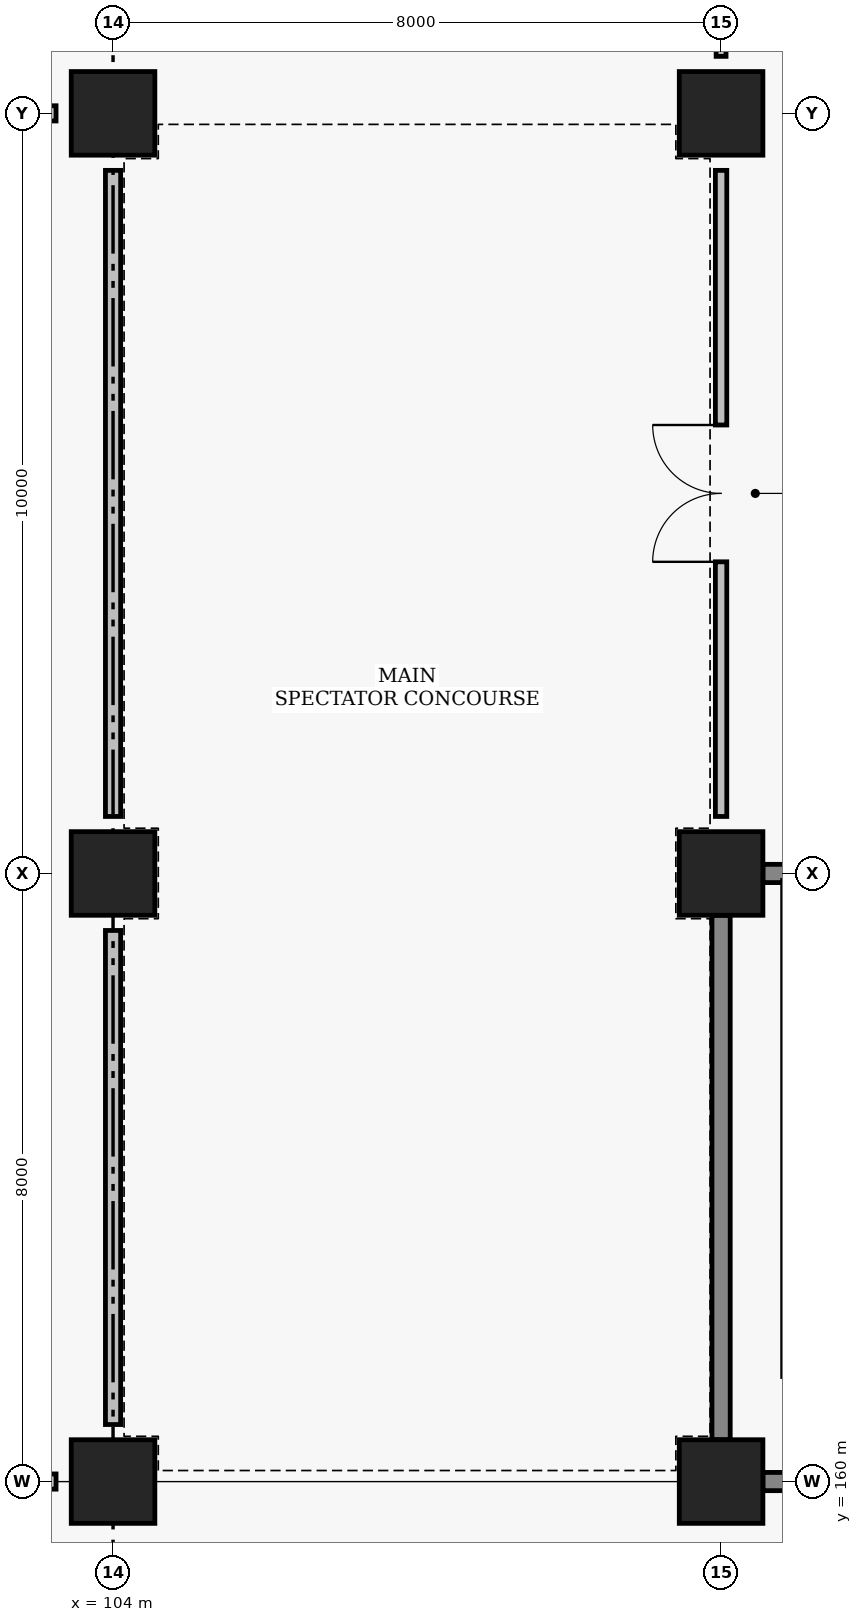
"""IFC4 building model, lengths in metres.
Left out: names, types, materials, properties, quantities, classifications, styles, units other than length and angle.
Written with IfcOpenShell. Run it as: python <this file> out.ifc"""

import sys

from ifc_helpers import new_model, si_unit, direction, frame, frame_2d, origin, origin_2d, place, context, subcontext, project, spatial, rectangle, extrude, element, fill, save


model = new_model("IFC4")
c1 = context("Model", 3, precision=1e-05, world=origin(), true_north=direction((0.0, 1.0)))
c2 = subcontext(c1, "Body", "Model", "MODEL_VIEW")
j1 = project(units=[si_unit("LENGTHUNIT", "METRE"), si_unit("PLANEANGLEUNIT", "RADIAN")], contexts=[c1])
p1 = place(None, origin())
s1 = spatial("IfcSite", under=j1, at=p1, CompositionType="ELEMENT")
p2 = place(p1, origin())
s2 = spatial("IfcBuilding", under=s1, at=p2, CompositionType="ELEMENT")
p3 = place(p2, origin())
s3 = spatial("IfcBuildingStorey", under=s2, at=p3, CompositionType="ELEMENT", Elevation=0.0)
for number, where, z_axis, x_axis in (
    (1, (104.0, 160.0, 0.0), (0.0, 0.0, 1.0), (1.0, 0.0, 0.0)),
    (2, (104.0, 168.0, 0.0), (0.0, 0.0, 1.0), (1.0, 0.0, 0.0)),
    (3, (104.0, 178.0, 0.0), (0.0, 0.0, 1.0), (1.0, 0.0, 0.0)),
    (4, (112.0, 160.0, 0.0), (0.0, 0.0, 1.0), (1.0, 0.0, 0.0)),
    (5, (112.0, 168.0, 0.0), (0.0, 0.0, 1.0), (1.0, 0.0, 0.0)),
    (6, (112.0, 178.0, 0.0), (0.0, 0.0, 1.0), (1.0, 0.0, 0.0)),
):
    element("IfcColumn", number, at=place(p3, frame(where, z_axis=z_axis, x_axis=x_axis)), inside=s3, PredefinedType="COLUMN", context=c2, shape_type="SweptSolid", body=[
        extrude(rectangle(XDim=1.1, YDim=1.1, at=origin_2d()), origin(), (0.0, 0.0, 1.0), 4.8),
    ])
p4 = place(p3, frame((112.55, 160.0, 0.0), z_axis=(0.0, 0.0, 1.0), x_axis=(1.0, 0.0, 0.0)))
e7 = element("IfcWall", 7, at=p4, inside=s3, PredefinedType="SHEAR", context=c2, shape_type="SweptSolid", body=[
    extrude(rectangle(XDim=6.9, YDim=0.24, at=frame_2d((3.45, 0.0))), origin(), (0.0, 0.0, 1.0), 3.66),
])
p5 = place(p4, frame((4.75, 0.0, 0.0)))
e8 = element("IfcOpeningElement", 8, at=p5, cuts=e7, PredefinedType="OPENING", context=c2, shape_type="SweptSolid", body=[
    extrude(rectangle(XDim=1.1, YDim=2.2, at=frame_2d((0.55, 1.1))), frame((0.0, 0.13, 0.0), z_axis=(0.0, -1.0, 0.0), x_axis=(1.0, 0.0, 0.0)), (0.0, 0.0, 1.0), 0.26),
])
for number, where, z_axis, x_axis in (
    (9, (112.55, 168.0, 0.0), (0.0, 0.0, 1.0), (1.0, 0.0, 0.0)),
    (10, (112.0, 160.55, 0.0), (0.0, 0.0, 1.0), (0.0, 1.0, 0.0)),
):
    element("IfcWall", number, at=place(p3, frame(where, z_axis=z_axis, x_axis=x_axis)), inside=s3, PredefinedType="SHEAR", context=c2, shape_type="SweptSolid", body=[
        extrude(rectangle(XDim=6.9, YDim=0.24, at=frame_2d((3.45, 0.0))), origin(), (0.0, 0.0, 1.0), 3.71),
    ])
p6 = place(p3, frame((104.0, 160.75, 0.0), z_axis=(0.0, 0.0, 1.0), x_axis=(0.0, 1.0, 0.0)))
e11 = element("IfcWall", 11, at=p6, inside=s3, PredefinedType="PARTITIONING", context=c2, shape_type="SweptSolid", body=[
    extrude(rectangle(XDim=6.5, YDim=0.2, at=frame_2d((3.25, 0.0))), origin(), (0.0, 0.0, 1.0), 3.81),
])
p7 = place(p3, frame((96.75, 160.0, 0.0), z_axis=(0.0, 0.0, 1.0), x_axis=(1.0, 0.0, 0.0)))
e12 = element("IfcWall", 12, at=p7, inside=s3, PredefinedType="PARTITIONING", context=c2, shape_type="SweptSolid", body=[
    extrude(rectangle(XDim=6.5, YDim=0.2, at=frame_2d((3.25, 0.0))), origin(), (0.0, 0.0, 1.0), 3.91),
])
p8 = place(p3, frame((104.0, 168.75, 0.0), z_axis=(0.0, 0.0, 1.0), x_axis=(0.0, 1.0, 0.0)))
e13 = element("IfcWall", 13, at=p8, inside=s3, PredefinedType="PARTITIONING", context=c2, shape_type="SweptSolid", body=[
    extrude(rectangle(XDim=8.5, YDim=0.2, at=frame_2d((4.25, 0.0))), origin(), (0.0, 0.0, 1.0), 3.71),
])
p9 = place(p3, frame((96.75, 178.0, 0.0), z_axis=(0.0, 0.0, 1.0), x_axis=(1.0, 0.0, 0.0)))
e14 = element("IfcWall", 14, at=p9, inside=s3, PredefinedType="PARTITIONING", context=c2, shape_type="SweptSolid", body=[
    extrude(rectangle(XDim=6.5, YDim=0.2, at=frame_2d((3.25, 0.0))), origin(), (0.0, 0.0, 1.0), 3.91),
])
p10 = place(p3, frame((112.0, 178.75, 0.0), z_axis=(0.0, 0.0, 1.0), x_axis=(0.0, 1.0, 0.0)))
e15 = element("IfcWall", 15, at=p10, inside=s3, PredefinedType="PARTITIONING", context=c2, shape_type="SweptSolid", body=[
    extrude(rectangle(XDim=8.5, YDim=0.13, at=frame_2d((4.25, 0.0))), origin(), (0.0, 0.0, 1.0), 3.77),
])
p11 = place(p10, frame((3.75, 0.0, 0.0)))
e16 = element("IfcOpeningElement", 16, at=p11, cuts=e15, PredefinedType="OPENING", context=c2, shape_type="SweptSolid", body=[
    extrude(rectangle(XDim=1.0, YDim=2.1, at=frame_2d((0.5, 1.05))), frame((0.0, 0.075, 0.0), z_axis=(0.0, -1.0, 0.0), x_axis=(1.0, 0.0, 0.0)), (0.0, 0.0, 1.0), 0.15),
])
p12 = place(p3, frame((112.0, 168.75, 0.0), z_axis=(0.0, 0.0, 1.0), x_axis=(0.0, 1.0, 0.0)))
e17 = element("IfcWall", 17, at=p12, inside=s3, PredefinedType="PARTITIONING", context=c2, shape_type="SweptSolid", body=[
    extrude(rectangle(XDim=8.5, YDim=0.15, at=frame_2d((4.25, 0.0))), origin(), (0.0, 0.0, 1.0), 3.71),
])
p13 = place(p12, frame((3.35, 0.0, 0.0)))
e18 = element("IfcOpeningElement", 18, at=p13, cuts=e17, PredefinedType="OPENING", context=c2, shape_type="SweptSolid", body=[
    extrude(rectangle(XDim=1.8, YDim=2.3, at=frame_2d((0.9, 1.15))), frame((0.0, 0.085, 0.0), z_axis=(0.0, -1.0, 0.0), x_axis=(1.0, 0.0, 0.0)), (0.0, 0.0, 1.0), 0.17),
])
p14 = place(p13, origin())
e19 = element("IfcDoor", 19, at=p14, inside=s3, OperationType="DOUBLE_SWING_LEFT", PredefinedType="DOOR", context=c2, shape_type="SweptSolid", body=[
    extrude(rectangle(XDim=1.8, YDim=2.3, at=frame_2d((0.9, 1.15))), frame((0.0, 0.025, 0.0), z_axis=(0.0, -1.0, 0.0), x_axis=(1.0, 0.0, 0.0)), (0.0, 0.0, 1.0), 0.05),
])
fill(e18, e19)
save(model, sys.argv[1])
